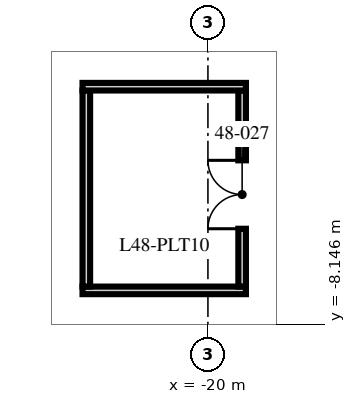
"""IFC4 building model, lengths in metres.
Left out: names, types, materials, properties, quantities, classifications, styles, units other than length and angle.
Written with IfcOpenShell. Run it as: python <this file> out.ifc"""

import sys

from ifc_helpers import new_model, si_unit, direction, frame, frame_2d, origin, origin_2d, place, context, subcontext, project, spatial, rectangle, hollow_rectangle, extrude, element, fill, save


model = new_model("IFC4")
c1 = context("Model", 3, precision=1e-05, world=origin(), true_north=direction((0.0, 1.0)))
c2 = subcontext(c1, "Body", "Model", "MODEL_VIEW")
j1 = project(units=[si_unit("LENGTHUNIT", "METRE"), si_unit("PLANEANGLEUNIT", "RADIAN")], contexts=[c1])
p1 = place(None, origin())
s1 = spatial("IfcSite", under=j1, at=p1, CompositionType="ELEMENT")
p2 = place(p1, origin())
s2 = spatial("IfcBuilding", under=s1, at=p2, CompositionType="ELEMENT")
p3 = place(p2, frame((0.0, 0.0, 192.0)))
s3 = spatial("IfcBuildingStorey", under=s2, at=p3, CompositionType="ELEMENT", Elevation=192.0)
p4 = place(p3, frame((-27.1, -9.16, -0.65), z_axis=(0.332991803119, 0.103570687408, 0.937224397765), x_axis=(-0.034607128924, 0.994622092871, -0.097617821118)))
e1 = element("IfcColumn", 1, at=p4, inside=s3, PredefinedType="COLUMN", context=c2, shape_type="SweptSolid", body=[
    extrude(hollow_rectangle(XDim=3.2, YDim=1.8, WallThickness=0.2, at=origin_2d()), origin(), (0.0, 0.0, 1.0), 8.109),
])
p5 = place(p3, frame((-27.1, 0.0, -0.65), z_axis=(0.334792284074, 0.0, 0.942291953974), x_axis=(0.0, 1.0, 0.0)))
e2 = element("IfcColumn", 2, at=p5, inside=s3, PredefinedType="COLUMN", context=c2, shape_type="SweptSolid", body=[
    extrude(hollow_rectangle(XDim=3.2, YDim=1.8, WallThickness=0.2, at=origin_2d()), origin(), (0.0, 0.0, 1.0), 8.065),
])
p6 = place(p3, frame((-23.3, -7.26, 0.0), z_axis=(0.0, 0.0, 1.0), x_axis=(1.0, 0.0, 0.0)))
e3 = element("IfcWall", 3, at=p6, inside=s3, PredefinedType="SOLIDWALL", context=c2, shape_type="SweptSolid", body=[
    extrude(rectangle(XDim=4.3, YDim=0.2, at=frame_2d((2.15, 0.0))), origin(), (0.0, 0.0, 1.0), 7.25),
])
p7 = place(p3, frame((-23.2, -7.16, 0.0), z_axis=(0.0, 0.0, 1.0), x_axis=(0.0, 1.0, 0.0)))
e4 = element("IfcWall", 4, at=p7, inside=s3, PredefinedType="SOLIDWALL", context=c2, shape_type="SweptSolid", body=[
    extrude(rectangle(XDim=5.16, YDim=0.2, at=frame_2d((2.58, 0.0))), origin(), (0.0, 0.0, 1.0), 6.56),
])
p8 = place(p3, frame((-19.1, -7.16, 0.0), z_axis=(0.0, 0.0, 1.0), x_axis=(0.0, 1.0, 0.0)))
e5 = element("IfcWall", 5, at=p8, inside=s3, PredefinedType="SOLIDWALL", context=c2, shape_type="SweptSolid", body=[
    extrude(rectangle(XDim=5.16, YDim=0.2, at=frame_2d((2.58, 0.0))), origin(), (0.0, 0.0, 1.0), 6.56),
])
p9 = place(p8, frame((1.522, 0.0, 0.0)))
e6 = element("IfcOpeningElement", 6, at=p9, cuts=e5, PredefinedType="OPENING", context=c2, shape_type="SweptSolid", body=[
    extrude(rectangle(XDim=1.8, YDim=2.4, at=frame_2d((0.9, 1.2))), frame((0.0, 0.11, 0.0), z_axis=(0.0, -1.0, 0.0), x_axis=(1.0, 0.0, 0.0)), (0.0, 0.0, 1.0), 0.22),
])
p10 = place(p3, frame((-23.3, -1.9, 0.0), z_axis=(0.0, 0.0, 1.0), x_axis=(1.0, 0.0, 0.0)))
e7 = element("IfcWall", 7, at=p10, inside=s3, PredefinedType="SOLIDWALL", context=c2, shape_type="SweptSolid", body=[
    extrude(rectangle(XDim=4.3, YDim=0.2, at=frame_2d((2.15, 0.0))), origin(), (0.0, 0.0, 1.0), 7.25),
])
p11 = place(p9, origin())
e8 = element("IfcDoor", 8, at=p11, inside=s3, OperationType="DOUBLE_DOOR_SINGLE_SWING", PredefinedType="DOOR", context=c2, shape_type="SweptSolid", body=[
    extrude(rectangle(XDim=1.8, YDim=2.4, at=frame_2d((0.9, 1.2))), frame((0.0, 0.025, 0.0), z_axis=(0.0, -1.0, 0.0), x_axis=(1.0, 0.0, 0.0)), (0.0, 0.0, 1.0), 0.05),
])
fill(e6, e8)
save(model, sys.argv[1])
